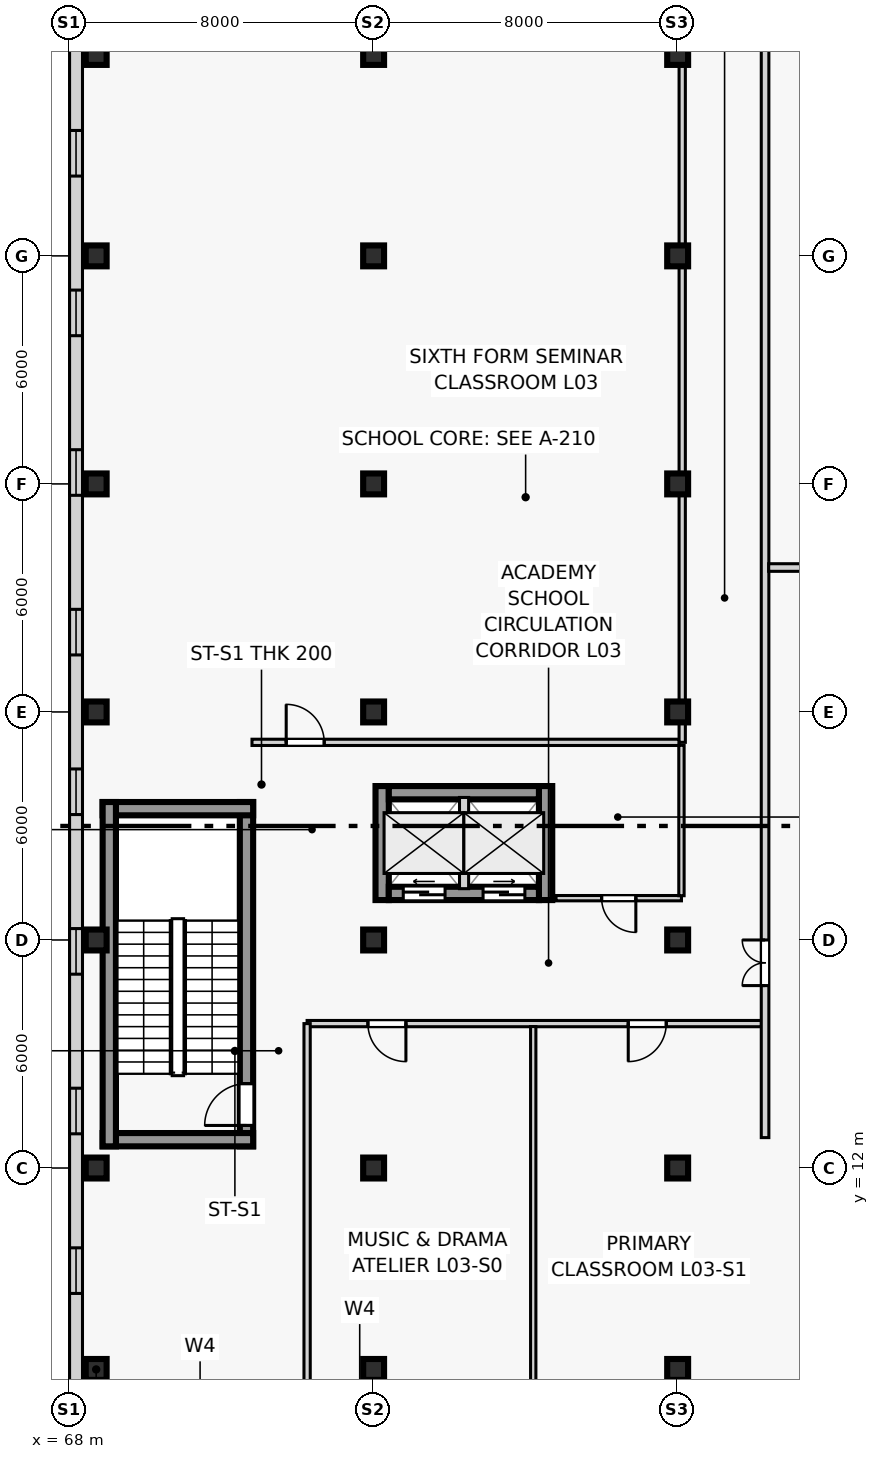
"""IFC4 building model, lengths in metres.
Left out: names, types, materials, properties, quantities, classifications, styles, units other than length and angle.
Written with IfcOpenShell. Run it as: python <this file> out.ifc"""

import sys

from ifc_helpers import new_model, si_unit, direction, frame, frame_2d, origin, origin_2d, place, context, subcontext, project, spatial, rectangle, extrude, source, transform, mapped, element, fill, save


model = new_model("IFC4")
c1 = context("Model", 3, precision=1e-05, world=origin(), true_north=direction((0.0, 1.0)))
c2 = subcontext(c1, "Body", "Model", "MODEL_VIEW")
j1 = project(units=[si_unit("LENGTHUNIT", "METRE"), si_unit("PLANEANGLEUNIT", "RADIAN")], contexts=[c1])
p1 = place(None, origin())
s1 = spatial("IfcSite", under=j1, at=p1, CompositionType="ELEMENT")
p2 = place(p1, origin())
s2 = spatial("IfcBuilding", under=s1, at=p2, CompositionType="ELEMENT")
p3 = place(p2, frame((0.0, 0.0, 13.5)))
s3 = spatial("IfcBuildingStorey", under=s2, at=p3, CompositionType="ELEMENT", Elevation=13.5)
p4 = place(p3, frame((72.655, 12.57, 0.0), z_axis=(0.0, 0.0, 1.0), x_axis=(0.0, 1.0, 0.0)))
e1 = element("IfcWall", 1, at=p4, inside=s3, PredefinedType="SHEAR", context=c2, shape_type="SweptSolid", body=[
    extrude(rectangle(XDim=9.06, YDim=0.35, at=frame_2d((4.53, 0.0))), origin(), (0.0, 0.0, 1.0), 4.5),
])
p5 = place(p4, frame((0.55, 0.0, 0.0)))
e2 = element("IfcOpeningElement", 2, at=p5, cuts=e1, PredefinedType="OPENING", context=c2, shape_type="SweptSolid", body=[
    extrude(rectangle(XDim=1.1, YDim=2.2, at=frame_2d((0.55, 1.1))), frame((0.0, 0.185, 0.0), z_axis=(0.0, -1.0, 0.0), x_axis=(1.0, 0.0, 0.0)), (0.0, 0.0, 1.0), 0.37),
])
for number, where, z_axis, x_axis in (
    (3, (68.87, 12.745, 0.0), (0.0, 0.0, 1.0), (1.0, 0.0, 0.0)),
    (4, (68.87, 21.455, 0.0), (0.0, 0.0, 1.0), (1.0, 0.0, 0.0)),
):
    element("IfcWall", number, at=place(p3, frame(where, z_axis=z_axis, x_axis=x_axis)), inside=s3, PredefinedType="SHEAR", context=c2, shape_type="SweptSolid", body=[
        extrude(rectangle(XDim=3.96, YDim=0.35, at=frame_2d((1.98, 0.0))), origin(), (0.0, 0.0, 1.0), 4.5),
    ])
p6 = place(p3, frame((69.045, 12.57, 0.0), z_axis=(0.0, 0.0, 1.0), x_axis=(0.0, 1.0, 0.0)))
e5 = element("IfcWall", 5, at=p6, inside=s3, PredefinedType="SHEAR", context=c2, shape_type="SweptSolid", body=[
    extrude(rectangle(XDim=9.06, YDim=0.35, at=frame_2d((4.53, 0.0))), origin(), (0.0, 0.0, 1.0), 4.5),
])
for number, where, z_axis, x_axis in (
    (6, (76.225, 19.05, 0.0), (0.0, 0.0, 1.0), (0.0, 1.0, 0.0)),
    (7, (80.525, 19.05, 0.0), (0.0, 0.0, 1.0), (0.0, 1.0, 0.0)),
):
    element("IfcWall", number, at=place(p3, frame(where, z_axis=z_axis, x_axis=x_axis)), inside=s3, PredefinedType="SHEAR", context=c2, shape_type="SweptSolid", body=[
        extrude(rectangle(XDim=3.0, YDim=0.35, at=frame_2d((1.5, 0.0))), origin(), (0.0, 0.0, 1.0), 4.5),
    ])
p7 = place(p3, frame((76.4, 21.875, 0.0), z_axis=(0.0, 0.0, 1.0), x_axis=(1.0, 0.0, 0.0)))
e8 = element("IfcWall", 8, at=p7, inside=s3, PredefinedType="SHEAR", context=c2, shape_type="SweptSolid", body=[
    extrude(rectangle(XDim=3.95, YDim=0.35, at=frame_2d((1.975, 0.0))), origin(), (0.0, 0.0, 1.0), 4.5),
])
p8 = place(p3, frame((76.4, 19.225, 0.0), z_axis=(0.0, 0.0, 1.0), x_axis=(1.0, 0.0, 0.0)))
e9 = element("IfcWall", 9, at=p8, inside=s3, PredefinedType="SHEAR", context=c2, shape_type="SweptSolid", body=[
    extrude(rectangle(XDim=3.95, YDim=0.35, at=frame_2d((1.975, 0.0))), origin(), (0.0, 0.0, 1.0), 4.5),
])
p9 = place(p8, frame((0.38, 0.0, 0.0)))
e10 = element("IfcOpeningElement", 10, at=p9, cuts=e9, PredefinedType="OPENING", context=c2, shape_type="SweptSolid", body=[
    extrude(rectangle(XDim=1.1, YDim=2.2, at=frame_2d((0.55, 1.1))), frame((0.0, 0.185, 0.0), z_axis=(0.0, -1.0, 0.0), x_axis=(1.0, 0.0, 0.0)), (0.0, 0.0, 1.0), 0.37),
])
p10 = place(p8, frame((2.48, 0.0, 0.0)))
e11 = element("IfcOpeningElement", 11, at=p10, cuts=e9, PredefinedType="OPENING", context=c2, shape_type="SweptSolid", body=[
    extrude(rectangle(XDim=1.1, YDim=2.2, at=frame_2d((0.55, 1.1))), frame((0.0, 0.185, 0.0), z_axis=(0.0, -1.0, 0.0), x_axis=(1.0, 0.0, 0.0)), (0.0, 0.0, 1.0), 0.37),
])
m1 = source(origin(), c2, "Body", "SweptSolid", [
    extrude(rectangle(XDim=0.55, YDim=0.55, at=origin_2d()), origin(), (0.0, 0.0, 1.0), 4.5),
])
for number, where, z_axis, x_axis in (
    (12, (68.7, 6.7, 0.0), (0.0, 0.0, 1.0), (1.0, 0.0, 0.0)),
    (13, (68.7, 12.0, 0.0), (0.0, 0.0, 1.0), (1.0, 0.0, 0.0)),
    (14, (68.7, 18.0, 0.0), (0.0, 0.0, 1.0), (1.0, 0.0, 0.0)),
    (15, (68.7, 24.0, 0.0), (0.0, 0.0, 1.0), (1.0, 0.0, 0.0)),
    (16, (68.7, 30.0, 0.0), (0.0, 0.0, 1.0), (1.0, 0.0, 0.0)),
    (17, (68.7, 36.0, 0.0), (0.0, 0.0, 1.0), (1.0, 0.0, 0.0)),
    (18, (68.7, 41.3, 0.0), (0.0, 0.0, 1.0), (1.0, 0.0, 0.0)),
    (19, (76.0, 6.7, 0.0), (0.0, 0.0, 1.0), (1.0, 0.0, 0.0)),
    (20, (76.0, 12.0, 0.0), (0.0, 0.0, 1.0), (1.0, 0.0, 0.0)),
    (21, (76.0, 18.0, 0.0), (0.0, 0.0, 1.0), (1.0, 0.0, 0.0)),
    (22, (76.0, 24.0, 0.0), (0.0, 0.0, 1.0), (1.0, 0.0, 0.0)),
    (23, (76.0, 30.0, 0.0), (0.0, 0.0, 1.0), (1.0, 0.0, 0.0)),
    (24, (76.0, 36.0, 0.0), (0.0, 0.0, 1.0), (1.0, 0.0, 0.0)),
    (25, (76.0, 41.3, 0.0), (0.0, 0.0, 1.0), (1.0, 0.0, 0.0)),
    (26, (84.0, 6.7, 0.0), (0.0, 0.0, 1.0), (1.0, 0.0, 0.0)),
    (27, (84.0, 12.0, 0.0), (0.0, 0.0, 1.0), (1.0, 0.0, 0.0)),
    (28, (84.0, 18.0, 0.0), (0.0, 0.0, 1.0), (1.0, 0.0, 0.0)),
    (29, (84.0, 24.0, 0.0), (0.0, 0.0, 1.0), (1.0, 0.0, 0.0)),
    (30, (84.0, 30.0, 0.0), (0.0, 0.0, 1.0), (1.0, 0.0, 0.0)),
    (31, (84.0, 36.0, 0.0), (0.0, 0.0, 1.0), (1.0, 0.0, 0.0)),
    (32, (84.0, 41.3, 0.0), (0.0, 0.0, 1.0), (1.0, 0.0, 0.0)),
):
    element("IfcColumn", number, at=place(p3, frame(where, z_axis=z_axis, x_axis=x_axis)), inside=s3, PredefinedType="COLUMN", context=c2, shape_type="MappedRepresentation", body=[
        mapped(m1, transform((0.0, 0.0, 0.0), scale=1.0)),
    ])
p11 = place(p3, frame((68.17, 41.83, 0.0), z_axis=(0.0, 0.0, 1.0), x_axis=(0.0, -1.0, 0.0)))
e33 = element("IfcWall", 33, at=p11, inside=s3, PredefinedType="SOLIDWALL", context=c2, shape_type="SweptSolid", body=[
    extrude(rectangle(XDim=35.66, YDim=0.34, at=frame_2d((17.83, 0.0))), origin(), (0.0, 0.0, 1.0), 4.2),
])
p12 = place(p11, frame((2.53, 0.0, 0.95)))
e34 = element("IfcOpeningElement", 34, at=p12, cuts=e33, PredefinedType="OPENING", context=c2, shape_type="SweptSolid", body=[
    extrude(rectangle(XDim=1.2, YDim=1.5, at=frame_2d((0.6, 0.75))), frame((0.0, 0.18, 0.0), z_axis=(0.0, -1.0, 0.0), x_axis=(1.0, 0.0, 0.0)), (0.0, 0.0, 1.0), 0.36),
])
p13 = place(p11, frame((6.73, 0.0, 0.95)))
e35 = element("IfcOpeningElement", 35, at=p13, cuts=e33, PredefinedType="OPENING", context=c2, shape_type="SweptSolid", body=[
    extrude(rectangle(XDim=1.2, YDim=1.5, at=frame_2d((0.6, 0.75))), frame((0.0, 0.18, 0.0), z_axis=(0.0, -1.0, 0.0), x_axis=(1.0, 0.0, 0.0)), (0.0, 0.0, 1.0), 0.36),
])
p14 = place(p11, frame((10.93, 0.0, 0.95)))
e36 = element("IfcOpeningElement", 36, at=p14, cuts=e33, PredefinedType="OPENING", context=c2, shape_type="SweptSolid", body=[
    extrude(rectangle(XDim=1.2, YDim=1.5, at=frame_2d((0.6, 0.75))), frame((0.0, 0.18, 0.0), z_axis=(0.0, -1.0, 0.0), x_axis=(1.0, 0.0, 0.0)), (0.0, 0.0, 1.0), 0.36),
])
p15 = place(p11, frame((15.13, 0.0, 0.95)))
e37 = element("IfcOpeningElement", 37, at=p15, cuts=e33, PredefinedType="OPENING", context=c2, shape_type="SweptSolid", body=[
    extrude(rectangle(XDim=1.2, YDim=1.5, at=frame_2d((0.6, 0.75))), frame((0.0, 0.18, 0.0), z_axis=(0.0, -1.0, 0.0), x_axis=(1.0, 0.0, 0.0)), (0.0, 0.0, 1.0), 0.36),
])
p16 = place(p11, frame((19.33, 0.0, 0.95)))
e38 = element("IfcOpeningElement", 38, at=p16, cuts=e33, PredefinedType="OPENING", context=c2, shape_type="SweptSolid", body=[
    extrude(rectangle(XDim=1.2, YDim=1.5, at=frame_2d((0.6, 0.75))), frame((0.0, 0.18, 0.0), z_axis=(0.0, -1.0, 0.0), x_axis=(1.0, 0.0, 0.0)), (0.0, 0.0, 1.0), 0.36),
])
p17 = place(p11, frame((23.53, 0.0, 0.95)))
e39 = element("IfcOpeningElement", 39, at=p17, cuts=e33, PredefinedType="OPENING", context=c2, shape_type="SweptSolid", body=[
    extrude(rectangle(XDim=1.2, YDim=1.5, at=frame_2d((0.6, 0.75))), frame((0.0, 0.18, 0.0), z_axis=(0.0, -1.0, 0.0), x_axis=(1.0, 0.0, 0.0)), (0.0, 0.0, 1.0), 0.36),
])
p18 = place(p11, frame((27.73, 0.0, 0.95)))
e40 = element("IfcOpeningElement", 40, at=p18, cuts=e33, PredefinedType="OPENING", context=c2, shape_type="SweptSolid", body=[
    extrude(rectangle(XDim=1.2, YDim=1.5, at=frame_2d((0.6, 0.75))), frame((0.0, 0.18, 0.0), z_axis=(0.0, -1.0, 0.0), x_axis=(1.0, 0.0, 0.0)), (0.0, 0.0, 1.0), 0.36),
])
p19 = place(p11, frame((31.93, 0.0, 0.95)))
e41 = element("IfcOpeningElement", 41, at=p19, cuts=e33, PredefinedType="OPENING", context=c2, shape_type="SweptSolid", body=[
    extrude(rectangle(XDim=1.2, YDim=1.5, at=frame_2d((0.6, 0.75))), frame((0.0, 0.18, 0.0), z_axis=(0.0, -1.0, 0.0), x_axis=(1.0, 0.0, 0.0)), (0.0, 0.0, 1.0), 0.36),
])
p20 = place(p3, frame((78.38, 19.35, 0.0), z_axis=(0.0, 0.0, 1.0), x_axis=(0.0, 1.0, 0.0)))
e42 = element("IfcWall", 42, at=p20, inside=s3, PredefinedType="PARTITIONING", context=c2, shape_type="SweptSolid", body=[
    extrude(rectangle(XDim=2.4, YDim=0.24, at=frame_2d((1.2, 0.0))), origin(), (0.0, 0.0, 1.0), 4.2),
])
p21 = place(p3, frame((74.25, 15.8, 0.0), z_axis=(0.0, 0.0, 1.0), x_axis=(1.0, 0.0, 0.0)))
e43 = element("IfcWall", 43, at=p21, inside=s3, PredefinedType="PARTITIONING", context=c2, shape_type="SweptSolid", body=[
    extrude(rectangle(XDim=11.955, YDim=0.165, at=frame_2d((5.978, 0.0))), origin(), (0.0, 0.0, 1.0), 4.2),
])
p22 = place(p21, frame((1.6, 0.0, 0.0)))
e44 = element("IfcOpeningElement", 44, at=p22, cuts=e43, PredefinedType="OPENING", context=c2, shape_type="SweptSolid", body=[
    extrude(rectangle(XDim=1.0, YDim=2.15, at=frame_2d((0.5, 1.075))), frame((0.0, 0.093, 0.0), z_axis=(0.0, -1.0, 0.0), x_axis=(1.0, 0.0, 0.0)), (0.0, 0.0, 1.0), 0.185),
])
p23 = place(p21, frame((8.45, 0.0, 0.0)))
e45 = element("IfcOpeningElement", 45, at=p23, cuts=e43, PredefinedType="OPENING", context=c2, shape_type="SweptSolid", body=[
    extrude(rectangle(XDim=1.0, YDim=2.15, at=frame_2d((0.5, 1.075))), frame((0.0, 0.093, 0.0), z_axis=(0.0, -1.0, 0.0), x_axis=(1.0, 0.0, 0.0)), (0.0, 0.0, 1.0), 0.185),
])
p24 = place(p3, frame((72.8, 23.2, 0.0), z_axis=(0.0, 0.0, 1.0), x_axis=(1.0, 0.0, 0.0)))
e46 = element("IfcWall", 46, at=p24, inside=s3, PredefinedType="PARTITIONING", context=c2, shape_type="SweptSolid", body=[
    extrude(rectangle(XDim=11.242, YDim=0.165, at=frame_2d((5.621, 0.0))), origin(), (0.0, 0.0, 1.0), 4.2),
])
p25 = place(p24, frame((0.9, 0.0, 0.0)))
e47 = element("IfcOpeningElement", 47, at=p25, cuts=e46, PredefinedType="OPENING", context=c2, shape_type="SweptSolid", body=[
    extrude(rectangle(XDim=1.0, YDim=2.15, at=frame_2d((0.5, 1.075))), frame((0.0, 0.093, 0.0), z_axis=(0.0, -1.0, 0.0), x_axis=(1.0, 0.0, 0.0)), (0.0, 0.0, 1.0), 0.185),
])
p26 = place(p3, frame((80.8, 19.1, 0.0), z_axis=(0.0, 0.0, 1.0), x_axis=(1.0, 0.0, 0.0)))
e48 = element("IfcWall", 48, at=p26, inside=s3, PredefinedType="PLUMBINGWALL", context=c2, shape_type="SweptSolid", body=[
    extrude(rectangle(XDim=3.3, YDim=0.14, at=frame_2d((1.65, 0.0))), origin(), (0.0, 0.0, 1.0), 4.2),
])
p27 = place(p26, frame((1.2, 0.0, 0.0)))
e49 = element("IfcOpeningElement", 49, at=p27, cuts=e48, PredefinedType="OPENING", context=c2, shape_type="SweptSolid", body=[
    extrude(rectangle(XDim=0.9, YDim=2.1, at=frame_2d((0.45, 1.05))), frame((0.0, 0.08, 0.0), z_axis=(0.0, -1.0, 0.0), x_axis=(1.0, 0.0, 0.0)), (0.0, 0.0, 1.0), 0.16),
])
p28 = place(p3, frame((84.1, 19.165, 0.0), z_axis=(0.0, 0.0, 1.0), x_axis=(0.0, 1.0, 0.0)))
e50 = element("IfcWall", 50, at=p28, inside=s3, PredefinedType="PLUMBINGWALL", context=c2, shape_type="SweptSolid", body=[
    extrude(rectangle(XDim=3.958, YDim=0.14, at=frame_2d((1.979, 0.0))), origin(), (0.0, 0.0, 1.0), 3.55),
])
p29 = place(p3, frame((80.2, 6.185, 0.0), z_axis=(0.0, 0.0, 1.0), x_axis=(0.0, 1.0, 0.0)))
e51 = element("IfcWall", 51, at=p29, inside=s3, PredefinedType="PARTITIONING", context=c2, shape_type="SweptSolid", body=[
    extrude(rectangle(XDim=9.537, YDim=0.14, at=frame_2d((4.769, 0.0))), origin(), (0.0, 0.0, 1.0), 4.2),
])
p30 = place(p3, frame((86.3, 12.8, 0.0), z_axis=(0.0, 0.0, 1.0), x_axis=(0.0, 1.0, 0.0)))
e52 = element("IfcWall", 52, at=p30, inside=s3, PredefinedType="PARTITIONING", context=c2, shape_type="SweptSolid", body=[
    extrude(rectangle(XDim=29.015, YDim=0.2, at=frame_2d((14.507, 0.0))), origin(), (0.0, 0.0, 1.0), 4.2),
])
p31 = place(p30, frame((4.0, 0.0, 0.0)))
e53 = element("IfcOpeningElement", 53, at=p31, cuts=e52, PredefinedType="OPENING", context=c2, shape_type="SweptSolid", body=[
    extrude(rectangle(XDim=1.2, YDim=2.2, at=frame_2d((0.6, 1.1))), frame((0.0, 0.11, 0.0), z_axis=(0.0, -1.0, 0.0), x_axis=(1.0, 0.0, 0.0)), (0.0, 0.0, 1.0), 0.22),
])
p32 = place(p3, frame((74.25, 6.185, 0.0), z_axis=(0.0, 0.0, 1.0), x_axis=(0.0, 1.0, 0.0)))
e54 = element("IfcWall", 54, at=p32, inside=s3, PredefinedType="PARTITIONING", context=c2, shape_type="SweptSolid", body=[
    extrude(rectangle(XDim=9.615, YDim=0.165, at=frame_2d((4.808, 0.0))), origin(), (0.0, 0.0, 1.0), 4.2),
])
p33 = place(p3, frame((84.12, 23.2, 0.0), z_axis=(0.0, 0.0, 1.0), x_axis=(0.0, 1.0, 0.0)))
e55 = element("IfcWall", 55, at=p33, inside=s3, PredefinedType="PARTITIONING", context=c2, shape_type="SweptSolid", body=[
    extrude(rectangle(XDim=18.615, YDim=0.165, at=frame_2d((9.308, 0.0))), origin(), (0.0, 0.0, 1.0), 3.55),
])
p34 = place(p3, frame((86.395, 27.8, 0.0), z_axis=(0.0, 0.0, 1.0), x_axis=(1.0, 0.0, 0.0)))
e56 = element("IfcWall", 56, at=p34, inside=s3, PredefinedType="PARTITIONING", context=c2, shape_type="SweptSolid", body=[
    extrude(rectangle(XDim=16.755, YDim=0.2, at=frame_2d((8.377, 0.0))), origin(), (0.0, 0.0, 1.0), 4.2),
])
m2 = source(origin(), c2, "Body", "SweptSolid", [
    extrude(rectangle(XDim=1.2, YDim=1.5, at=frame_2d((0.6, 0.75))), frame((0.0, 0.03, 0.0), z_axis=(0.0, -1.0, 0.0), x_axis=(1.0, 0.0, 0.0)), (0.0, 0.0, 1.0), 0.06),
])
p35 = place(p12, origin())
e57 = element("IfcWindow", 57, at=p35, inside=s3, PartitioningType="SINGLE_PANEL", PredefinedType="WINDOW", context=c2, shape_type="MappedRepresentation", body=[
    mapped(m2, transform((0.0, 0.0, 0.0), scale=1.0)),
])
fill(e34, e57)
p36 = place(p13, origin())
e58 = element("IfcWindow", 58, at=p36, inside=s3, PartitioningType="SINGLE_PANEL", PredefinedType="WINDOW", context=c2, shape_type="MappedRepresentation", body=[
    mapped(m2, transform((0.0, 0.0, 0.0), scale=1.0)),
])
fill(e35, e58)
p37 = place(p14, origin())
e59 = element("IfcWindow", 59, at=p37, inside=s3, PartitioningType="SINGLE_PANEL", PredefinedType="WINDOW", context=c2, shape_type="MappedRepresentation", body=[
    mapped(m2, transform((0.0, 0.0, 0.0), scale=1.0)),
])
fill(e36, e59)
p38 = place(p15, origin())
e60 = element("IfcWindow", 60, at=p38, inside=s3, PartitioningType="SINGLE_PANEL", PredefinedType="WINDOW", context=c2, shape_type="MappedRepresentation", body=[
    mapped(m2, transform((0.0, 0.0, 0.0), scale=1.0)),
])
fill(e37, e60)
p39 = place(p16, origin())
e61 = element("IfcWindow", 61, at=p39, inside=s3, PartitioningType="SINGLE_PANEL", PredefinedType="WINDOW", context=c2, shape_type="MappedRepresentation", body=[
    mapped(m2, transform((0.0, 0.0, 0.0), scale=1.0)),
])
fill(e38, e61)
p40 = place(p17, origin())
e62 = element("IfcWindow", 62, at=p40, inside=s3, PartitioningType="SINGLE_PANEL", PredefinedType="WINDOW", context=c2, shape_type="MappedRepresentation", body=[
    mapped(m2, transform((0.0, 0.0, 0.0), scale=1.0)),
])
fill(e39, e62)
p41 = place(p18, origin())
e63 = element("IfcWindow", 63, at=p41, inside=s3, PartitioningType="SINGLE_PANEL", PredefinedType="WINDOW", context=c2, shape_type="MappedRepresentation", body=[
    mapped(m2, transform((0.0, 0.0, 0.0), scale=1.0)),
])
fill(e40, e63)
p42 = place(p19, origin())
e64 = element("IfcWindow", 64, at=p42, inside=s3, PartitioningType="SINGLE_PANEL", PredefinedType="WINDOW", context=c2, shape_type="MappedRepresentation", body=[
    mapped(m2, transform((0.0, 0.0, 0.0), scale=1.0)),
])
fill(e41, e64)
m3 = source(origin(), c2, "Body", "SweptSolid", [
    extrude(rectangle(XDim=1.1, YDim=2.2, at=frame_2d((0.55, 1.1))), frame((0.0, 0.025, 0.0), z_axis=(0.0, -1.0, 0.0), x_axis=(1.0, 0.0, 0.0)), (0.0, 0.0, 1.0), 0.05),
])
p43 = place(p5, origin())
e65 = element("IfcDoor", 65, at=p43, inside=s3, OperationType="SINGLE_SWING_LEFT", PredefinedType="DOOR", context=c2, shape_type="MappedRepresentation", body=[
    mapped(m3, transform((0.0, 0.0, 0.0), scale=1.0)),
])
fill(e2, e65)
m4 = source(origin(), c2, "Body", "SweptSolid", [
    extrude(rectangle(XDim=1.1, YDim=2.2, at=frame_2d((0.55, 1.1))), frame((0.0, 0.025, 0.0), z_axis=(0.0, -1.0, 0.0), x_axis=(1.0, 0.0, 0.0)), (0.0, 0.0, 1.0), 0.05),
])
p44 = place(p9, origin())
e66 = element("IfcDoor", 66, at=p44, inside=s3, OperationType="SLIDING_TO_LEFT", PredefinedType="DOOR", context=c2, shape_type="MappedRepresentation", body=[
    mapped(m4, transform((0.0, 0.0, 0.0), scale=1.0)),
])
fill(e10, e66)
p45 = place(p10, origin())
e67 = element("IfcDoor", 67, at=p45, inside=s3, OperationType="SLIDING_TO_RIGHT", PredefinedType="DOOR", context=c2, shape_type="MappedRepresentation", body=[
    mapped(m4, transform((0.0, 0.0, 0.0), scale=1.0)),
])
fill(e11, e67)
m5 = source(origin(), c2, "Body", "SweptSolid", [
    extrude(rectangle(XDim=0.9, YDim=2.1, at=frame_2d((0.45, 1.05))), frame((0.0, 0.025, 0.0), z_axis=(0.0, -1.0, 0.0), x_axis=(1.0, 0.0, 0.0)), (0.0, 0.0, 1.0), 0.05),
])
p46 = place(p27, frame((0.9, 0.0, 0.0), z_axis=(0.0, 0.0, 1.0), x_axis=(-1.0, 0.0, 0.0)))
e68 = element("IfcDoor", 68, at=p46, inside=s3, OperationType="SINGLE_SWING_LEFT", PredefinedType="DOOR", context=c2, shape_type="MappedRepresentation", body=[
    mapped(m5, transform((0.0, 0.0, 0.0), scale=1.0)),
])
fill(e49, e68)
m6 = source(origin(), c2, "Body", "SweptSolid", [
    extrude(rectangle(XDim=1.0, YDim=2.15, at=frame_2d((0.5, 1.075))), frame((0.0, 0.025, 0.0), z_axis=(0.0, -1.0, 0.0), x_axis=(1.0, 0.0, 0.0)), (0.0, 0.0, 1.0), 0.05),
])
p47 = place(p22, frame((1.0, 0.0, 0.0), z_axis=(0.0, 0.0, 1.0), x_axis=(-1.0, 0.0, 0.0)))
e69 = element("IfcDoor", 69, at=p47, inside=s3, OperationType="SINGLE_SWING_LEFT", PredefinedType="DOOR", context=c2, shape_type="MappedRepresentation", body=[
    mapped(m6, transform((0.0, 0.0, 0.0), scale=1.0)),
])
fill(e44, e69)
p48 = place(p23, frame((1.0, 0.0, 0.0), z_axis=(0.0, 0.0, 1.0), x_axis=(-1.0, 0.0, 0.0)))
e70 = element("IfcDoor", 70, at=p48, inside=s3, OperationType="SINGLE_SWING_RIGHT", PredefinedType="DOOR", context=c2, shape_type="MappedRepresentation", body=[
    mapped(m6, transform((0.0, 0.0, 0.0), scale=1.0)),
])
fill(e45, e70)
m7 = source(origin(), c2, "Body", "SweptSolid", [
    extrude(rectangle(XDim=1.2, YDim=2.2, at=frame_2d((0.6, 1.1))), frame((0.0, 0.025, 0.0), z_axis=(0.0, -1.0, 0.0), x_axis=(1.0, 0.0, 0.0)), (0.0, 0.0, 1.0), 0.05),
])
p49 = place(p31, origin())
e71 = element("IfcDoor", 71, at=p49, inside=s3, OperationType="DOUBLE_DOOR_SINGLE_SWING", PredefinedType="DOOR", context=c2, shape_type="MappedRepresentation", body=[
    mapped(m7, transform((0.0, 0.0, 0.0), scale=1.0)),
])
fill(e53, e71)
p50 = place(p25, origin())
e72 = element("IfcDoor", 72, at=p50, inside=s3, OperationType="SINGLE_SWING_LEFT", PredefinedType="DOOR", context=c2, shape_type="MappedRepresentation", body=[
    mapped(m6, transform((0.0, 0.0, 0.0), scale=1.0)),
])
fill(e47, e72)
save(model, sys.argv[1])
